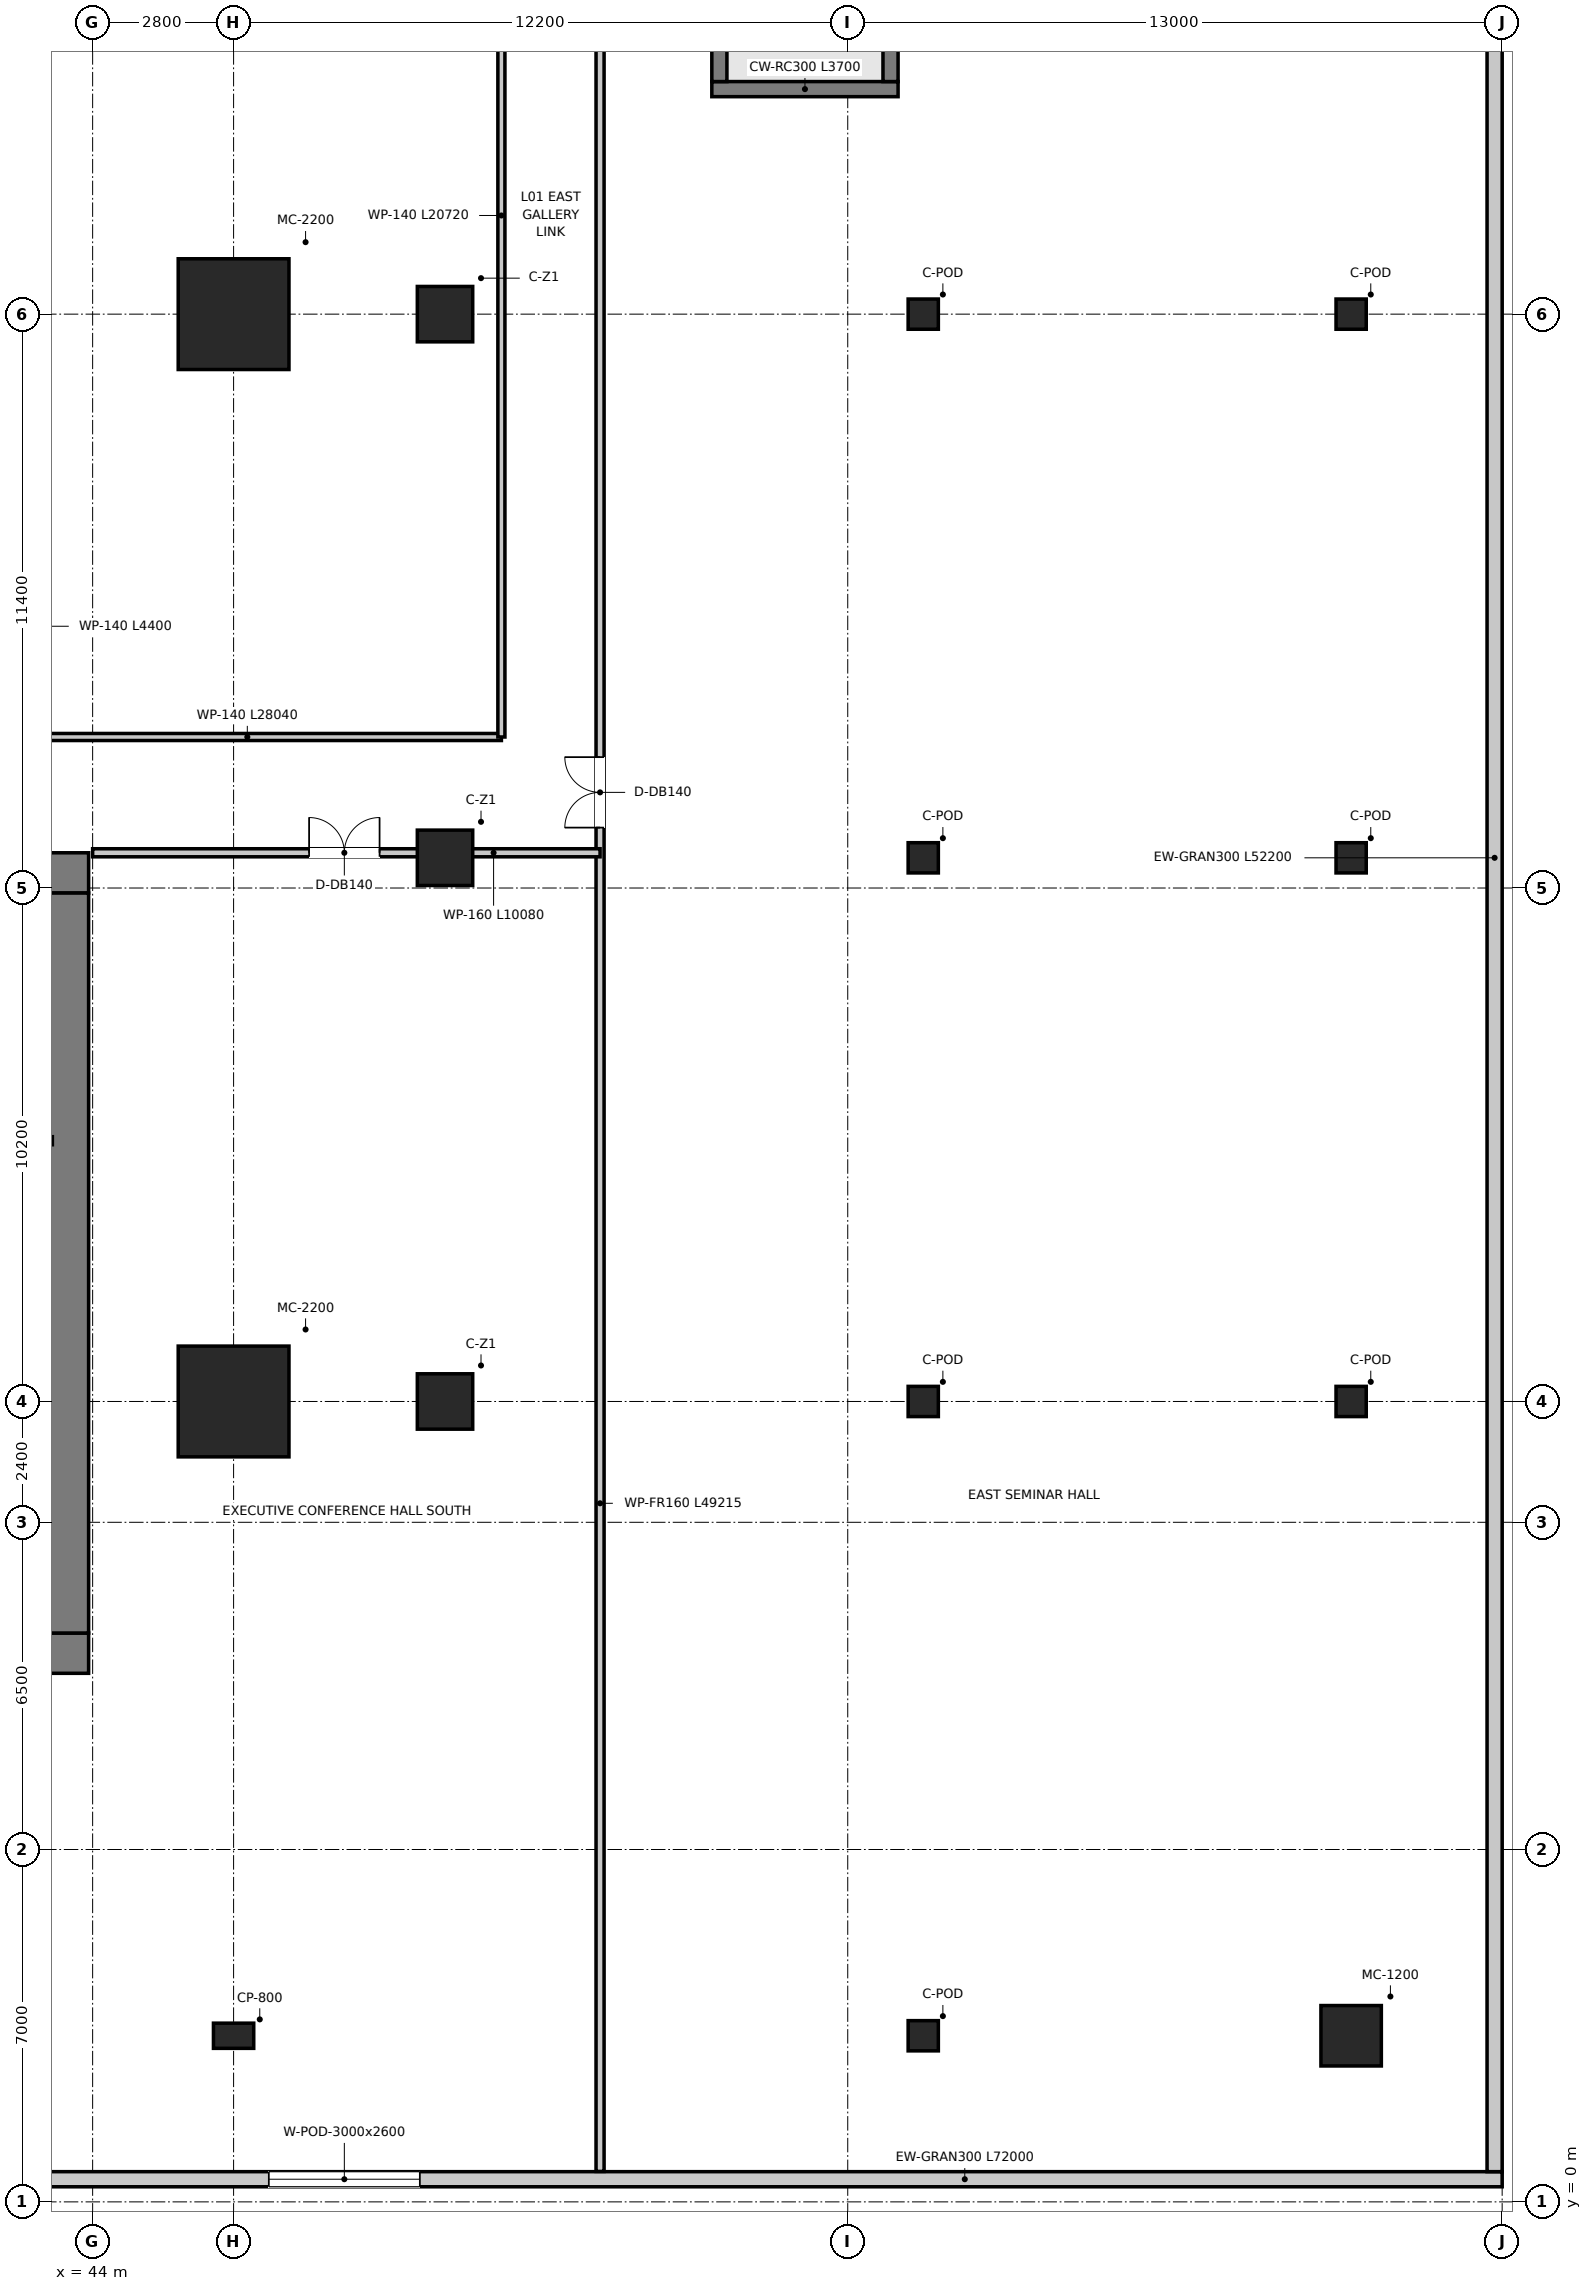
"""IFC4 building model, lengths in metres.
Left out: names, types, materials, properties, quantities, classifications, styles, units other than length and angle.
Written with IfcOpenShell. Run it as: python <this file> out.ifc"""

import sys

from ifc_helpers import new_model, si_unit, direction, frame, frame_2d, origin, origin_2d, place, context, subcontext, project, spatial, rectangle, extrude, source, transform, mapped, element, fill, save


model = new_model("IFC4")
c1 = context("Model", 3, precision=1e-05, world=origin(), true_north=direction((0.0, 1.0)))
c2 = subcontext(c1, "Body", "Model", "MODEL_VIEW")
j1 = project(units=[si_unit("LENGTHUNIT", "METRE"), si_unit("PLANEANGLEUNIT", "RADIAN")], contexts=[c1])
p1 = place(None, origin())
s1 = spatial("IfcSite", under=j1, at=p1, CompositionType="ELEMENT")
p2 = place(p1, origin())
s2 = spatial("IfcBuilding", under=s1, at=p2, CompositionType="ELEMENT")
p3 = place(p2, frame((0.0, 0.0, 5.4)))
s3 = spatial("IfcBuildingStorey", under=s2, at=p3, CompositionType="ELEMENT", Elevation=5.4)
p4 = place(p3, frame((28.08, 10.9, 0.0), z_axis=(0.0, 0.0, 1.0), x_axis=(1.0, 0.0, 0.0)))
e1 = element("IfcWall", 1, at=p4, inside=s3, PredefinedType="SHEAR", context=c2, shape_type="SweptSolid", body=[
    extrude(rectangle(XDim=15.84, YDim=0.8, at=frame_2d((7.92, 0.0))), origin(), (0.0, 0.0, 1.0), 5.0),
])
p5 = place(p3, frame((28.08, 26.4, 0.0), z_axis=(0.0, 0.0, 1.0), x_axis=(1.0, 0.0, 0.0)))
e2 = element("IfcWall", 2, at=p5, inside=s3, PredefinedType="SHEAR", context=c2, shape_type="SweptSolid", body=[
    extrude(rectangle(XDim=15.84, YDim=0.8, at=frame_2d((7.92, 0.0))), origin(), (0.0, 0.0, 1.0), 5.0),
])
p6 = place(p5, frame((7.22, 0.0, 0.0)))
e3 = element("IfcOpeningElement", 3, at=p6, cuts=e2, PredefinedType="OPENING", context=c2, shape_type="SweptSolid", body=[
    extrude(rectangle(XDim=1.4, YDim=2.2, at=frame_2d((0.7, 1.1))), frame((0.0, 0.41, 0.0), z_axis=(0.0, -1.0, 0.0), x_axis=(1.0, 0.0, 0.0)), (0.0, 0.0, 1.0), 0.82),
])
p7 = place(p5, frame((1.775, 0.0, 0.0)))
e4 = element("IfcOpeningElement", 4, at=p7, cuts=e2, PredefinedType="OPENING", context=c2, shape_type="SweptSolid", body=[
    extrude(rectangle(XDim=1.05, YDim=2.1, at=frame_2d((0.525, 1.05))), frame((0.0, 0.41, 0.0), z_axis=(0.0, -1.0, 0.0), x_axis=(1.0, 0.0, 0.0)), (0.0, 0.0, 1.0), 0.82),
])
p8 = place(p5, frame((13.015, 0.0, 0.0)))
e5 = element("IfcOpeningElement", 5, at=p8, cuts=e2, PredefinedType="OPENING", context=c2, shape_type="SweptSolid", body=[
    extrude(rectangle(XDim=1.05, YDim=2.1, at=frame_2d((0.525, 1.05))), frame((0.0, 0.41, 0.0), z_axis=(0.0, -1.0, 0.0), x_axis=(1.0, 0.0, 0.0)), (0.0, 0.0, 1.0), 0.82),
])
p9 = place(p3, frame((43.52, 11.3, 0.0), z_axis=(0.0, 0.0, 1.0), x_axis=(0.0, 1.0, 0.0)))
e6 = element("IfcWall", 6, at=p9, inside=s3, PredefinedType="SHEAR", context=c2, shape_type="SweptSolid", body=[
    extrude(rectangle(XDim=14.7, YDim=0.8, at=frame_2d((7.35, 0.0))), origin(), (0.0, 0.0, 1.0), 5.0),
])
p10 = place(p3, frame((56.3, 41.97, 0.0), z_axis=(0.0, 0.0, 1.0), x_axis=(1.0, 0.0, 0.0)))
e7 = element("IfcWall", 7, at=p10, inside=s3, PredefinedType="SHEAR", context=c2, shape_type="SweptSolid", body=[
    extrude(rectangle(XDim=3.7, YDim=0.3, at=frame_2d((1.85, 0.0))), origin(), (0.0, 0.0, 1.0), 5.0),
])
for number, where, z_axis, x_axis in (
    (8, (56.45, 42.12, 0.0), (0.0, 0.0, 1.0), (0.0, 1.0, 0.0)),
    (9, (59.85, 42.12, 0.0), (0.0, 0.0, 1.0), (0.0, 1.0, 0.0)),
):
    element("IfcWall", number, at=place(p3, frame(where, z_axis=z_axis, x_axis=x_axis)), inside=s3, PredefinedType="SHEAR", context=c2, shape_type="SweptSolid", body=[
        extrude(rectangle(XDim=7.48, YDim=0.3, at=frame_2d((3.74, 0.0))), origin(), (0.0, 0.0, 1.0), 5.0),
    ])
m1 = source(origin(), c2, "Body", "SweptSolid", [
    extrude(rectangle(XDim=2.2, YDim=2.2, at=origin_2d()), origin(), (0.0, 0.0, 1.0), 5.0),
])
for number, where, z_axis, x_axis in (
    (10, (46.8, 15.9, 0.0), (0.0, 0.0, 1.0), (1.0, 0.0, 0.0)),
    (11, (46.8, 37.5, 0.0), (0.0, 0.0, 1.0), (1.0, 0.0, 0.0)),
):
    element("IfcColumn", number, at=place(p3, frame(where, z_axis=z_axis, x_axis=x_axis)), inside=s3, PredefinedType="USERDEFINED", context=c2, shape_type="MappedRepresentation", body=[
        mapped(m1, transform((0.0, 0.0, 0.0), x_axis=(1.0, 0.0, 0.0), y_axis=(0.0, 1.0, 0.0), z_axis=(0.0, 0.0, 1.0), scale=1.0)),
    ])
m2 = source(origin(), c2, "Body", "SweptSolid", [
    extrude(rectangle(XDim=1.1, YDim=1.1, at=origin_2d()), origin(), (0.0, 0.0, 1.0), 5.0),
])
for number, where, z_axis, x_axis in (
    (12, (51.0, 37.5, 0.0), (0.0, 0.0, 1.0), (1.0, 0.0, 0.0)),
    (13, (51.0, 26.7, 0.0), (0.0, 0.0, 1.0), (1.0, 0.0, 0.0)),
    (14, (51.0, 15.9, 0.0), (0.0, 0.0, 1.0), (1.0, 0.0, 0.0)),
):
    element("IfcColumn", number, at=place(p3, frame(where, z_axis=z_axis, x_axis=x_axis)), inside=s3, PredefinedType="COLUMN", context=c2, shape_type="MappedRepresentation", body=[
        mapped(m2, transform((0.0, 0.0, 0.0), x_axis=(1.0, 0.0, 0.0), y_axis=(0.0, 1.0, 0.0), z_axis=(0.0, 0.0, 1.0), scale=1.0)),
    ])
m3 = source(origin(), c2, "Body", "SweptSolid", [
    extrude(rectangle(XDim=1.2, YDim=1.2, at=origin_2d()), origin(), (0.0, 0.0, 1.0), 5.0),
])
p11 = place(p3, frame((69.0, 3.3, 0.0), z_axis=(0.0, 0.0, 1.0), x_axis=(1.0, 0.0, 0.0)))
e15 = element("IfcColumn", 15, at=p11, inside=s3, PredefinedType="USERDEFINED", context=c2, shape_type="MappedRepresentation", body=[
    mapped(m3, transform((0.0, 0.0, 0.0), x_axis=(1.0, 0.0, 0.0), y_axis=(0.0, 1.0, 0.0), z_axis=(0.0, 0.0, 1.0), scale=1.0)),
])
m4 = source(origin(), c2, "Body", "SweptSolid", [
    extrude(rectangle(XDim=0.6, YDim=0.6, at=origin_2d()), origin(), (0.0, 0.0, 1.0), 5.0),
])
for number, where, z_axis, x_axis in (
    (16, (69.0, 15.9, 0.0), (0.0, 0.0, 1.0), (1.0, 0.0, 0.0)),
    (17, (69.0, 26.7, 0.0), (0.0, 0.0, 1.0), (1.0, 0.0, 0.0)),
    (18, (69.0, 37.5, 0.0), (0.0, 0.0, 1.0), (1.0, 0.0, 0.0)),
    (19, (60.5, 15.9, 0.0), (0.0, 0.0, 1.0), (1.0, 0.0, 0.0)),
    (20, (60.5, 26.7, 0.0), (0.0, 0.0, 1.0), (1.0, 0.0, 0.0)),
    (21, (60.5, 37.5, 0.0), (0.0, 0.0, 1.0), (1.0, 0.0, 0.0)),
    (22, (60.5, 3.3, 0.0), (0.0, 0.0, 1.0), (1.0, 0.0, 0.0)),
):
    element("IfcColumn", number, at=place(p3, frame(where, z_axis=z_axis, x_axis=x_axis)), inside=s3, PredefinedType="COLUMN", context=c2, shape_type="MappedRepresentation", body=[
        mapped(m4, transform((0.0, 0.0, 0.0), x_axis=(1.0, 0.0, 0.0), y_axis=(0.0, 1.0, 0.0), z_axis=(0.0, 0.0, 1.0), scale=1.0)),
    ])
m5 = source(origin(), c2, "Body", "SweptSolid", [
    extrude(rectangle(XDim=0.8, YDim=0.5, at=origin_2d()), origin(), (0.0, 0.0, 1.0), 5.0),
])
p12 = place(p3, frame((46.8, 3.3, 0.0), z_axis=(0.0, 0.0, 1.0), x_axis=(1.0, 0.0, 0.0)))
e23 = element("IfcColumn", 23, at=p12, inside=s3, PredefinedType="PILASTER", context=c2, shape_type="MappedRepresentation", body=[
    mapped(m5, transform((0.0, 0.0, 0.0), x_axis=(1.0, 0.0, 0.0), y_axis=(0.0, 1.0, 0.0), z_axis=(0.0, 0.0, 1.0), scale=1.0)),
])
p13 = place(p3, frame((72.0, 0.45, 0.0), z_axis=(0.0, 0.0, 1.0), x_axis=(-1.0, 0.0, 0.0)))
e24 = element("IfcWall", 24, at=p13, inside=s3, PredefinedType="SOLIDWALL", context=c2, shape_type="SweptSolid", body=[
    extrude(rectangle(XDim=72.0, YDim=0.3, at=frame_2d((36.0, 0.0))), origin(), (0.0, 0.0, 1.0), 4.7),
])
p14 = place(p13, frame((54.5, 0.0, 0.9)))
e25 = element("IfcOpeningElement", 25, at=p14, cuts=e24, PredefinedType="OPENING", context=c2, shape_type="SweptSolid", body=[
    extrude(rectangle(XDim=2.4, YDim=2.6, at=frame_2d((1.2, 1.3))), frame((0.0, 0.16, 0.0), z_axis=(0.0, -1.0, 0.0), x_axis=(1.0, 0.0, 0.0)), (0.0, 0.0, 1.0), 0.32),
])
p15 = place(p13, frame((45.5, 0.0, 0.9)))
e26 = element("IfcOpeningElement", 26, at=p15, cuts=e24, PredefinedType="OPENING", context=c2, shape_type="SweptSolid", body=[
    extrude(rectangle(XDim=1.8, YDim=2.6, at=frame_2d((0.9, 1.3))), frame((0.0, 0.16, 0.0), z_axis=(0.0, -1.0, 0.0), x_axis=(1.0, 0.0, 0.0)), (0.0, 0.0, 1.0), 0.32),
])
p16 = place(p13, frame((39.0, 0.0, 0.95)))
e27 = element("IfcOpeningElement", 27, at=p16, cuts=e24, PredefinedType="OPENING", context=c2, shape_type="SweptSolid", body=[
    extrude(rectangle(XDim=1.5, YDim=2.4, at=frame_2d((0.75, 1.2))), frame((0.0, 0.16, 0.0), z_axis=(0.0, -1.0, 0.0), x_axis=(1.0, 0.0, 0.0)), (0.0, 0.0, 1.0), 0.32),
])
p17 = place(p13, frame((31.0, 0.0, 0.95)))
e28 = element("IfcOpeningElement", 28, at=p17, cuts=e24, PredefinedType="OPENING", context=c2, shape_type="SweptSolid", body=[
    extrude(rectangle(XDim=1.2, YDim=2.4, at=frame_2d((0.6, 1.2))), frame((0.0, 0.16, 0.0), z_axis=(0.0, -1.0, 0.0), x_axis=(1.0, 0.0, 0.0)), (0.0, 0.0, 1.0), 0.32),
])
p18 = place(p13, frame((21.5, 0.0, 0.9)))
e29 = element("IfcOpeningElement", 29, at=p18, cuts=e24, PredefinedType="OPENING", context=c2, shape_type="SweptSolid", body=[
    extrude(rectangle(XDim=3.0, YDim=2.6, at=frame_2d((1.5, 1.3))), frame((0.0, 0.16, 0.0), z_axis=(0.0, -1.0, 0.0), x_axis=(1.0, 0.0, 0.0)), (0.0, 0.0, 1.0), 0.32),
])
p19 = place(p3, frame((71.85, 52.8, 0.0), z_axis=(0.0, 0.0, 1.0), x_axis=(0.0, -1.0, 0.0)))
e30 = element("IfcWall", 30, at=p19, inside=s3, PredefinedType="SOLIDWALL", context=c2, shape_type="SweptSolid", body=[
    extrude(rectangle(XDim=52.2, YDim=0.3, at=frame_2d((26.1, 0.0))), origin(), (0.0, 0.0, 1.0), 4.7),
])
p20 = place(p3, frame((40.04, 21.08, 0.0), z_axis=(0.0, 0.0, 1.0), x_axis=(1.0, 0.0, 0.0)))
e31 = element("IfcWall", 31, at=p20, inside=s3, PredefinedType="PARTITIONING", context=c2, shape_type="SweptSolid", body=[
    extrude(rectangle(XDim=3.16, YDim=0.16, at=frame_2d((1.58, 0.0))), origin(), (0.0, 0.0, 1.0), 4.7),
])
p21 = place(p20, frame((1.055, 0.0, 0.0)))
e32 = element("IfcOpeningElement", 32, at=p21, cuts=e31, PredefinedType="OPENING", context=c2, shape_type="SweptSolid", body=[
    extrude(rectangle(XDim=1.05, YDim=2.1, at=frame_2d((0.525, 1.05))), frame((0.0, 0.09, 0.0), z_axis=(0.0, -1.0, 0.0), x_axis=(1.0, 0.0, 0.0)), (0.0, 0.0, 1.0), 0.18),
])
p22 = place(p3, frame((24.08, 29.1, 0.0), z_axis=(0.0, 0.0, 1.0), x_axis=(1.0, 0.0, 0.0)))
e33 = element("IfcWall", 33, at=p22, inside=s3, PredefinedType="PARTITIONING", context=c2, shape_type="SweptSolid", body=[
    extrude(rectangle(XDim=28.04, YDim=0.14, at=frame_2d((14.02, 0.0))), origin(), (0.0, 0.0, 1.0), 3.9),
])
p23 = place(p22, frame((8.745, 0.0, 0.0)))
e34 = element("IfcOpeningElement", 34, at=p23, cuts=e33, PredefinedType="OPENING", context=c2, shape_type="SweptSolid", body=[
    extrude(rectangle(XDim=0.95, YDim=2.1, at=frame_2d((0.475, 1.05))), frame((0.0, 0.08, 0.0), z_axis=(0.0, -1.0, 0.0), x_axis=(1.0, 0.0, 0.0)), (0.0, 0.0, 1.0), 0.16),
])
p24 = place(p22, frame((13.145, 0.0, 0.0)))
e35 = element("IfcOpeningElement", 35, at=p24, cuts=e33, PredefinedType="OPENING", context=c2, shape_type="SweptSolid", body=[
    extrude(rectangle(XDim=0.95, YDim=2.1, at=frame_2d((0.475, 1.05))), frame((0.0, 0.08, 0.0), z_axis=(0.0, -1.0, 0.0), x_axis=(1.0, 0.0, 0.0)), (0.0, 0.0, 1.0), 0.16),
])
p25 = place(p22, frame((16.845, 0.0, 0.0)))
e36 = element("IfcOpeningElement", 36, at=p25, cuts=e33, PredefinedType="OPENING", context=c2, shape_type="SweptSolid", body=[
    extrude(rectangle(XDim=0.95, YDim=2.1, at=frame_2d((0.475, 1.05))), frame((0.0, 0.08, 0.0), z_axis=(0.0, -1.0, 0.0), x_axis=(1.0, 0.0, 0.0)), (0.0, 0.0, 1.0), 0.16),
])
p26 = place(p3, frame((52.12, 29.1, 0.0), z_axis=(0.0, 0.0, 1.0), x_axis=(0.0, 1.0, 0.0)))
e37 = element("IfcWall", 37, at=p26, inside=s3, PredefinedType="PARTITIONING", context=c2, shape_type="SweptSolid", body=[
    extrude(rectangle(XDim=20.72, YDim=0.14, at=frame_2d((10.36, 0.0))), origin(), (0.0, 0.0, 1.0), 4.06),
])
p27 = place(p3, frame((54.08, 0.605, 0.0), z_axis=(0.0, 0.0, 1.0), x_axis=(0.0, 1.0, 0.0)))
e38 = element("IfcWall", 38, at=p27, inside=s3, PredefinedType="PARTITIONING", context=c2, shape_type="SweptSolid", body=[
    extrude(rectangle(XDim=49.215, YDim=0.16, at=frame_2d((24.607, 0.0))), origin(), (0.0, 0.0, 1.0), 4.06),
])
p28 = place(p27, frame((26.695, 0.0, 0.0)))
e39 = element("IfcOpeningElement", 39, at=p28, cuts=e38, PredefinedType="OPENING", context=c2, shape_type="SweptSolid", body=[
    extrude(rectangle(XDim=1.4, YDim=2.2, at=frame_2d((0.7, 1.1))), frame((0.0, 0.09, 0.0), z_axis=(0.0, -1.0, 0.0), x_axis=(1.0, 0.0, 0.0)), (0.0, 0.0, 1.0), 0.18),
])
p29 = place(p3, frame((44.0, 26.8, 0.0), z_axis=(0.0, 0.0, 1.0), x_axis=(1.0, 0.0, 0.0)))
e40 = element("IfcWall", 40, at=p29, inside=s3, PredefinedType="PARTITIONING", context=c2, shape_type="SweptSolid", body=[
    extrude(rectangle(XDim=10.08, YDim=0.16, at=frame_2d((5.04, 0.0))), origin(), (0.0, 0.0, 1.0), 3.9),
])
p30 = place(p29, frame((4.3, 0.0, 0.0)))
e41 = element("IfcOpeningElement", 41, at=p30, cuts=e40, PredefinedType="OPENING", context=c2, shape_type="SweptSolid", body=[
    extrude(rectangle(XDim=1.4, YDim=2.2, at=frame_2d((0.7, 1.1))), frame((0.0, 0.09, 0.0), z_axis=(0.0, -1.0, 0.0), x_axis=(1.0, 0.0, 0.0)), (0.0, 0.0, 1.0), 0.18),
])
p31 = place(p18, origin())
e42 = element("IfcWindow", 42, at=p31, inside=s3, PartitioningType="SINGLE_PANEL", PredefinedType="WINDOW", context=c2, shape_type="SweptSolid", body=[
    extrude(rectangle(XDim=3.0, YDim=2.6, at=frame_2d((1.5, 1.3))), frame((0.0, 0.03, 0.0), z_axis=(0.0, -1.0, 0.0), x_axis=(1.0, 0.0, 0.0)), (0.0, 0.0, 1.0), 0.06),
])
fill(e29, e42)
p32 = place(p30, origin())
e43 = element("IfcDoor", 43, at=p32, inside=s3, OperationType="DOUBLE_DOOR_SINGLE_SWING", PredefinedType="DOOR", context=c2, shape_type="SweptSolid", body=[
    extrude(rectangle(XDim=1.4, YDim=2.2, at=frame_2d((0.7, 1.1))), frame((0.0, 0.025, 0.0), z_axis=(0.0, -1.0, 0.0), x_axis=(1.0, 0.0, 0.0)), (0.0, 0.0, 1.0), 0.05),
])
fill(e41, e43)
p33 = place(p28, origin())
e44 = element("IfcDoor", 44, at=p33, inside=s3, OperationType="DOUBLE_DOOR_SINGLE_SWING", PredefinedType="DOOR", context=c2, shape_type="SweptSolid", body=[
    extrude(rectangle(XDim=1.4, YDim=2.2, at=frame_2d((0.7, 1.1))), frame((0.0, 0.025, 0.0), z_axis=(0.0, -1.0, 0.0), x_axis=(1.0, 0.0, 0.0)), (0.0, 0.0, 1.0), 0.05),
])
fill(e39, e44)
save(model, sys.argv[1])
